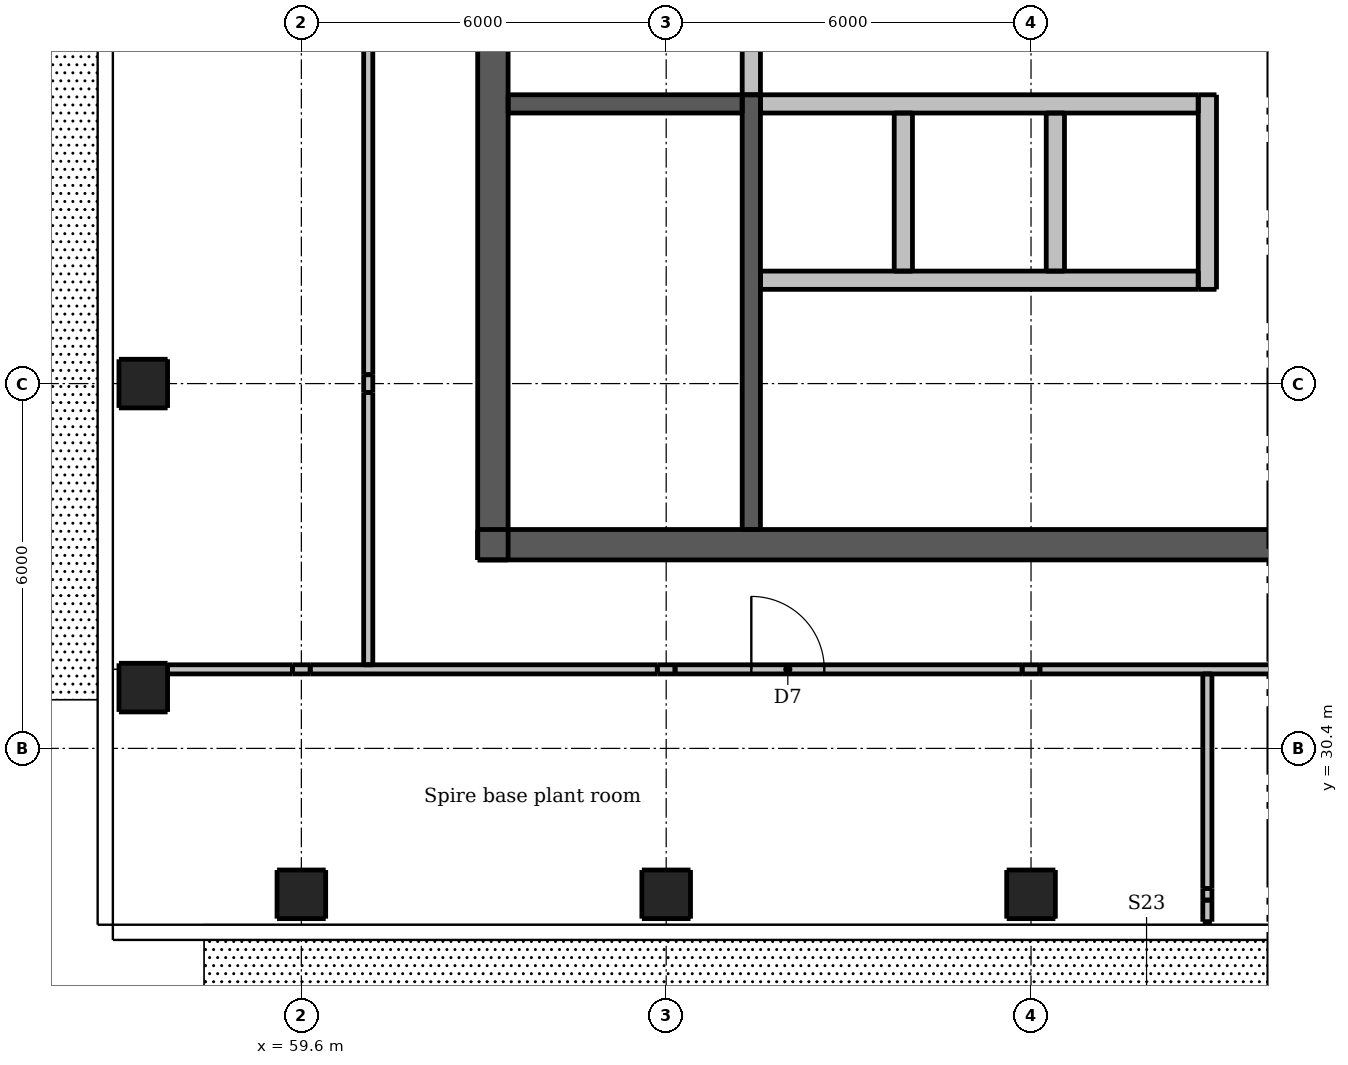
"""IFC4 building model, lengths in metres.
Left out: names, types, materials, properties, quantities, classifications, styles, units other than length and angle.
Written with IfcOpenShell. Run it as: python <this file> out.ifc"""

import sys

from ifc_helpers import new_model, si_unit, direction, frame, frame_2d, origin, origin_2d, place, context, subcontext, project, spatial, rectangle, extrude, element, fill, save


model = new_model("IFC4")
c1 = context("Model", 3, precision=1e-05, world=origin(), true_north=direction((0.0, 1.0)))
c2 = subcontext(c1, "Body", "Model", "MODEL_VIEW")
j1 = project(units=[si_unit("LENGTHUNIT", "METRE"), si_unit("PLANEANGLEUNIT", "RADIAN")], contexts=[c1])
p1 = place(None, origin())
s1 = spatial("IfcSite", under=j1, at=p1, CompositionType="ELEMENT")
p2 = place(p1, origin())
s2 = spatial("IfcBuilding", under=s1, at=p2, CompositionType="ELEMENT")
p3 = place(p2, frame((0.0, 0.0, 290.8)))
s3 = spatial("IfcBuildingStorey", under=s2, at=p3, CompositionType="ELEMENT", Elevation=290.8)
p4 = place(p3, frame((62.5, 33.75, 0.0), z_axis=(0.0, 0.0, 1.0), x_axis=(1.0, 0.0, 0.0)))
e1 = element("IfcWall", 1, at=p4, inside=s3, PredefinedType="SHEAR", context=c2, shape_type="SweptSolid", body=[
    extrude(rectangle(XDim=24.0, YDim=0.5, at=frame_2d((12.0, 0.0))), origin(), (0.0, 0.0, 1.0), 3.3),
])
p5 = place(p4, frame((1.875, 0.0, 0.0)))
e2 = element("IfcOpeningElement", 2, at=p5, cuts=e1, PredefinedType="OPENING", context=c2, shape_type="SweptSolid", body=[
    extrude(rectangle(XDim=1.1, YDim=2.1, at=frame_2d((0.55, 1.05))), frame((0.0, 0.26, 0.0), z_axis=(0.0, -1.0, 0.0), x_axis=(1.0, 0.0, 0.0)), (0.0, 0.0, 1.0), 0.52),
])
p6 = place(p4, frame((21.025, 0.0, 0.0)))
e3 = element("IfcOpeningElement", 3, at=p6, cuts=e1, PredefinedType="OPENING", context=c2, shape_type="SweptSolid", body=[
    extrude(rectangle(XDim=1.1, YDim=2.1, at=frame_2d((0.55, 1.05))), frame((0.0, 0.26, 0.0), z_axis=(0.0, -1.0, 0.0), x_axis=(1.0, 0.0, 0.0)), (0.0, 0.0, 1.0), 0.52),
])
p7 = place(p4, frame((11.55, 0.0, 0.0)))
e4 = element("IfcOpeningElement", 4, at=p7, cuts=e1, PredefinedType="OPENING", context=c2, shape_type="SweptSolid", body=[
    extrude(rectangle(XDim=0.9, YDim=2.1, at=frame_2d((0.45, 1.05))), frame((0.0, 0.26, 0.0), z_axis=(0.0, -1.0, 0.0), x_axis=(1.0, 0.0, 0.0)), (0.0, 0.0, 1.0), 0.52),
])
p8 = place(p3, frame((62.75, 33.5, 0.0), z_axis=(0.0, 0.0, 1.0), x_axis=(0.0, 1.0, 0.0)))
e5 = element("IfcWall", 5, at=p8, inside=s3, PredefinedType="SHEAR", context=c2, shape_type="SweptSolid", body=[
    extrude(rectangle(XDim=24.0, YDim=0.5, at=frame_2d((12.0, 0.0))), origin(), (0.0, 0.0, 1.0), 3.3),
])
p9 = place(p8, frame((11.55, 0.0, 0.0)))
e6 = element("IfcOpeningElement", 6, at=p9, cuts=e5, PredefinedType="OPENING", context=c2, shape_type="SweptSolid", body=[
    extrude(rectangle(XDim=0.9, YDim=2.1, at=frame_2d((0.45, 1.05))), frame((0.0, 0.26, 0.0), z_axis=(0.0, -1.0, 0.0), x_axis=(1.0, 0.0, 0.0)), (0.0, 0.0, 1.0), 0.52),
])
for number, where, z_axis, x_axis in (
    (7, (59.6, 28.0, 0.0), (0.0, 0.0, 1.0), (1.0, 0.0, 0.0)),
    (8, (65.6, 28.0, 0.0), (0.0, 0.0, 1.0), (1.0, 0.0, 0.0)),
    (9, (71.6, 28.0, 0.0), (0.0, 0.0, 1.0), (1.0, 0.0, 0.0)),
    (10, (57.0, 31.4, 0.0), (0.0, 0.0, 1.0), (1.0, 0.0, 0.0)),
    (11, (57.0, 36.4, 0.0), (0.0, 0.0, 1.0), (1.0, 0.0, 0.0)),
):
    element("IfcColumn", number, at=place(p3, frame(where, z_axis=z_axis, x_axis=x_axis)), inside=s3, PredefinedType="COLUMN", context=c2, shape_type="SweptSolid", body=[
        extrude(rectangle(XDim=0.8, YDim=0.8, at=origin_2d()), origin(), (0.0, 0.0, 1.0), 3.3),
    ])
p10 = place(p3, frame((67.0, 34.0, 0.0), z_axis=(0.0, 0.0, 1.0), x_axis=(0.0, 1.0, 0.0)))
e12 = element("IfcWall", 12, at=p10, inside=s3, PredefinedType="SHEAR", context=c2, shape_type="SweptSolid", body=[
    extrude(rectangle(XDim=7.15, YDim=0.3, at=frame_2d((3.575, 0.0))), origin(), (0.0, 0.0, 1.0), 3.3),
])
p11 = place(p10, frame((0.2, 0.0, 0.0)))
e13 = element("IfcOpeningElement", 13, at=p11, cuts=e12, PredefinedType="OPENING", context=c2, shape_type="SweptSolid", body=[
    extrude(rectangle(XDim=1.1, YDim=2.1, at=frame_2d((0.55, 1.05))), frame((0.0, 0.16, 0.0), z_axis=(0.0, -1.0, 0.0), x_axis=(1.0, 0.0, 0.0)), (0.0, 0.0, 1.0), 0.32),
])
p12 = place(p3, frame((67.0, 41.15, 0.0), z_axis=(0.0, 0.0, 1.0), x_axis=(0.0, 1.0, 0.0)))
e14 = element("IfcWall", 14, at=p12, inside=s3, PredefinedType="PARTITIONING", context=c2, shape_type="SweptSolid", body=[
    extrude(rectangle(XDim=8.7, YDim=0.3, at=frame_2d((4.35, 0.0))), origin(), (0.0, 0.0, 1.0), 3.3),
])
p13 = place(p12, frame((3.9, 0.0, 0.0)))
e15 = element("IfcOpeningElement", 15, at=p13, cuts=e14, PredefinedType="OPENING", context=c2, shape_type="SweptSolid", body=[
    extrude(rectangle(XDim=0.9, YDim=2.1, at=frame_2d((0.45, 1.05))), frame((0.0, 0.16, 0.0), z_axis=(0.0, -1.0, 0.0), x_axis=(1.0, 0.0, 0.0)), (0.0, 0.0, 1.0), 0.32),
])
p14 = place(p3, frame((63.0, 41.0, 0.0), z_axis=(0.0, 0.0, 1.0), x_axis=(1.0, 0.0, 0.0)))
e16 = element("IfcWall", 16, at=p14, inside=s3, PredefinedType="SHEAR", context=c2, shape_type="SweptSolid", body=[
    extrude(rectangle(XDim=3.85, YDim=0.3, at=frame_2d((1.925, 0.0))), origin(), (0.0, 0.0, 1.0), 3.3),
])
p15 = place(p3, frame((67.15, 38.1, 0.0), z_axis=(0.0, 0.0, 1.0), x_axis=(1.0, 0.0, 0.0)))
e17 = element("IfcWall", 17, at=p15, inside=s3, PredefinedType="PARTITIONING", context=c2, shape_type="SweptSolid", body=[
    extrude(rectangle(XDim=7.2, YDim=0.3, at=frame_2d((3.6, 0.0))), origin(), (0.0, 0.0, 1.0), 3.3),
])
p16 = place(p15, frame((0.55, 0.0, 0.0)))
e18 = element("IfcOpeningElement", 18, at=p16, cuts=e17, PredefinedType="OPENING", context=c2, shape_type="SweptSolid", body=[
    extrude(rectangle(XDim=1.1, YDim=2.1, at=frame_2d((0.55, 1.05))), frame((0.0, 0.16, 0.0), z_axis=(0.0, -1.0, 0.0), x_axis=(1.0, 0.0, 0.0)), (0.0, 0.0, 1.0), 0.32),
])
p17 = place(p15, frame((3.05, 0.0, 0.0)))
e19 = element("IfcOpeningElement", 19, at=p17, cuts=e17, PredefinedType="OPENING", context=c2, shape_type="SweptSolid", body=[
    extrude(rectangle(XDim=1.1, YDim=2.1, at=frame_2d((0.55, 1.05))), frame((0.0, 0.16, 0.0), z_axis=(0.0, -1.0, 0.0), x_axis=(1.0, 0.0, 0.0)), (0.0, 0.0, 1.0), 0.32),
])
p18 = place(p15, frame((5.5, 0.0, 0.0)))
e20 = element("IfcOpeningElement", 20, at=p18, cuts=e17, PredefinedType="OPENING", context=c2, shape_type="SweptSolid", body=[
    extrude(rectangle(XDim=1.2, YDim=2.1, at=frame_2d((0.6, 1.05))), frame((0.0, 0.16, 0.0), z_axis=(0.0, -1.0, 0.0), x_axis=(1.0, 0.0, 0.0)), (0.0, 0.0, 1.0), 0.32),
])
p19 = place(p3, frame((67.15, 41.0, 0.0), z_axis=(0.0, 0.0, 1.0), x_axis=(1.0, 0.0, 0.0)))
e21 = element("IfcWall", 21, at=p19, inside=s3, PredefinedType="PARTITIONING", context=c2, shape_type="SweptSolid", body=[
    extrude(rectangle(XDim=7.2, YDim=0.3, at=frame_2d((3.6, 0.0))), origin(), (0.0, 0.0, 1.0), 3.3),
])
for number, where, z_axis, x_axis in (
    (22, (69.5, 38.25, 0.0), (0.0, 0.0, 1.0), (0.0, 1.0, 0.0)),
    (23, (72.0, 38.25, 0.0), (0.0, 0.0, 1.0), (0.0, 1.0, 0.0)),
):
    element("IfcWall", number, at=place(p3, frame(where, z_axis=z_axis, x_axis=x_axis)), inside=s3, PredefinedType="PARTITIONING", context=c2, shape_type="SweptSolid", body=[
        extrude(rectangle(XDim=2.6, YDim=0.3, at=frame_2d((1.3, 0.0))), origin(), (0.0, 0.0, 1.0), 3.3),
    ])
p20 = place(p3, frame((74.5, 37.95, 0.0), z_axis=(0.0, 0.0, 1.0), x_axis=(0.0, 1.0, 0.0)))
e24 = element("IfcWall", 24, at=p20, inside=s3, PredefinedType="PARTITIONING", context=c2, shape_type="SweptSolid", body=[
    extrude(rectangle(XDim=3.2, YDim=0.3, at=frame_2d((1.6, 0.0))), origin(), (0.0, 0.0, 1.0), 3.3),
])
p21 = place(p3, frame((57.4, 31.7, 0.0), z_axis=(0.0, 0.0, 1.0), x_axis=(1.0, 0.0, 0.0)))
e25 = element("IfcWall", 25, at=p21, inside=s3, PredefinedType="PARTITIONING", context=c2, shape_type="SweptSolid", body=[
    extrude(rectangle(XDim=2.054, YDim=0.15, at=frame_2d((1.027, 0.0))), origin(), (0.0, 0.0, 1.0), 3.3),
])
p22 = place(p3, frame((59.454, 31.7, 0.0), z_axis=(0.0, 0.0, 1.0), x_axis=(1.0, 0.0, 0.0)))
e26 = element("IfcWall", 26, at=p22, inside=s3, PredefinedType="PARTITIONING", context=c2, shape_type="SweptSolid", body=[
    extrude(rectangle(XDim=0.292, YDim=0.15, at=frame_2d((0.146, 0.0))), origin(), (0.0, 0.0, 1.0), 2.462),
])
p23 = place(p3, frame((59.746, 31.7, 0.0), z_axis=(0.0, 0.0, 1.0), x_axis=(1.0, 0.0, 0.0)))
e27 = element("IfcWall", 27, at=p23, inside=s3, PredefinedType="PARTITIONING", context=c2, shape_type="SweptSolid", body=[
    extrude(rectangle(XDim=5.708, YDim=0.15, at=frame_2d((2.854, 0.0))), origin(), (0.0, 0.0, 1.0), 3.3),
])
p24 = place(p3, frame((65.454, 31.7, 0.0), z_axis=(0.0, 0.0, 1.0), x_axis=(1.0, 0.0, 0.0)))
e28 = element("IfcWall", 28, at=p24, inside=s3, PredefinedType="PARTITIONING", context=c2, shape_type="SweptSolid", body=[
    extrude(rectangle(XDim=0.292, YDim=0.15, at=frame_2d((0.146, 0.0))), origin(), (0.0, 0.0, 1.0), 2.465),
])
p25 = place(p3, frame((65.746, 31.7, 0.0), z_axis=(0.0, 0.0, 1.0), x_axis=(1.0, 0.0, 0.0)))
e29 = element("IfcWall", 29, at=p25, inside=s3, PredefinedType="PARTITIONING", context=c2, shape_type="SweptSolid", body=[
    extrude(rectangle(XDim=5.708, YDim=0.15, at=frame_2d((2.854, 0.0))), origin(), (0.0, 0.0, 1.0), 3.3),
])
p26 = place(p25, frame((1.254, 0.0, 0.0)))
e30 = element("IfcOpeningElement", 30, at=p26, cuts=e29, PredefinedType="OPENING", context=c2, shape_type="SweptSolid", body=[
    extrude(rectangle(XDim=1.2, YDim=2.1, at=frame_2d((0.6, 1.05))), frame((0.0, 0.085, 0.0), z_axis=(0.0, -1.0, 0.0), x_axis=(1.0, 0.0, 0.0)), (0.0, 0.0, 1.0), 0.17),
])
p27 = place(p3, frame((71.454, 31.7, 0.0), z_axis=(0.0, 0.0, 1.0), x_axis=(1.0, 0.0, 0.0)))
e31 = element("IfcWall", 31, at=p27, inside=s3, PredefinedType="PARTITIONING", context=c2, shape_type="SweptSolid", body=[
    extrude(rectangle(XDim=0.292, YDim=0.15, at=frame_2d((0.146, 0.0))), origin(), (0.0, 0.0, 1.0), 2.465),
])
p28 = place(p3, frame((71.746, 31.7, 0.0), z_axis=(0.0, 0.0, 1.0), x_axis=(1.0, 0.0, 0.0)))
e32 = element("IfcWall", 32, at=p28, inside=s3, PredefinedType="PARTITIONING", context=c2, shape_type="SweptSolid", body=[
    extrude(rectangle(XDim=5.708, YDim=0.15, at=frame_2d((2.854, 0.0))), origin(), (0.0, 0.0, 1.0), 3.3),
])
p29 = place(p3, frame((60.7, 31.775, 0.0), z_axis=(0.0, 0.0, 1.0), x_axis=(0.0, 1.0, 0.0)))
e33 = element("IfcWall", 33, at=p29, inside=s3, PredefinedType="PARTITIONING", context=c2, shape_type="SweptSolid", body=[
    extrude(rectangle(XDim=4.479, YDim=0.15, at=frame_2d((2.24, 0.0))), origin(), (0.0, 0.0, 1.0), 3.3),
])
p30 = place(p3, frame((60.7, 36.254, 0.0), z_axis=(0.0, 0.0, 1.0), x_axis=(0.0, 1.0, 0.0)))
e34 = element("IfcWall", 34, at=p30, inside=s3, PredefinedType="PARTITIONING", context=c2, shape_type="SweptSolid", body=[
    extrude(rectangle(XDim=0.292, YDim=0.15, at=frame_2d((0.146, 0.0))), origin(), (0.0, 0.0, 1.0), 2.459),
])
p31 = place(p3, frame((60.7, 36.546, 0.0), z_axis=(0.0, 0.0, 1.0), x_axis=(0.0, 1.0, 0.0)))
e35 = element("IfcWall", 35, at=p31, inside=s3, PredefinedType="PARTITIONING", context=c2, shape_type="SweptSolid", body=[
    extrude(rectangle(XDim=5.708, YDim=0.15, at=frame_2d((2.854, 0.0))), origin(), (0.0, 0.0, 1.0), 3.3),
])
p32 = place(p3, frame((74.5, 27.55, 0.0), z_axis=(0.0, 0.0, 1.0), x_axis=(0.0, 1.0, 0.0)))
e36 = element("IfcWall", 36, at=p32, inside=s3, PredefinedType="PARTITIONING", context=c2, shape_type="SweptSolid", body=[
    extrude(rectangle(XDim=0.355, YDim=0.15, at=frame_2d((0.177, 0.0))), origin(), (0.0, 0.0, 1.0), 3.3),
])
p33 = place(p3, frame((74.5, 27.905, 0.0), z_axis=(0.0, 0.0, 1.0), x_axis=(0.0, 1.0, 0.0)))
e37 = element("IfcWall", 37, at=p33, inside=s3, PredefinedType="PARTITIONING", context=c2, shape_type="SweptSolid", body=[
    extrude(rectangle(XDim=0.19, YDim=0.15, at=frame_2d((0.095, 0.0))), origin(), (0.0, 0.0, 1.0), 2.847),
])
p34 = place(p3, frame((74.5, 28.095, 0.0), z_axis=(0.0, 0.0, 1.0), x_axis=(0.0, 1.0, 0.0)))
e38 = element("IfcWall", 38, at=p34, inside=s3, PredefinedType="PARTITIONING", context=c2, shape_type="SweptSolid", body=[
    extrude(rectangle(XDim=3.53, YDim=0.15, at=frame_2d((1.765, 0.0))), origin(), (0.0, 0.0, 1.0), 3.3),
])
p35 = place(p11, origin())
e39 = element("IfcDoor", 39, at=p35, inside=s3, OperationType="SINGLE_SWING_LEFT", PredefinedType="DOOR", context=c2, shape_type="SweptSolid", body=[
    extrude(rectangle(XDim=1.1, YDim=2.1, at=frame_2d((0.55, 1.05))), frame((0.0, 0.138, 0.0), z_axis=(0.0, -1.0, 0.0), x_axis=(1.0, 0.0, 0.0)), (0.0, 0.0, 1.0), 0.05),
])
fill(e13, e39)
p36 = place(p5, origin())
e40 = element("IfcDoor", 40, at=p36, inside=s3, OperationType="SINGLE_SWING_LEFT", PredefinedType="DOOR", context=c2, shape_type="SweptSolid", body=[
    extrude(rectangle(XDim=1.1, YDim=2.1, at=frame_2d((0.55, 1.05))), frame((0.0, 0.237, 0.0), z_axis=(0.0, -1.0, 0.0), x_axis=(1.0, 0.0, 0.0)), (0.0, 0.0, 1.0), 0.05),
])
fill(e2, e40)
p37 = place(p7, origin())
e41 = element("IfcDoor", 41, at=p37, inside=s3, OperationType="SINGLE_SWING_LEFT", PredefinedType="DOOR", context=c2, shape_type="SweptSolid", body=[
    extrude(rectangle(XDim=0.9, YDim=2.1, at=frame_2d((0.45, 1.05))), frame((0.0, 0.237, 0.0), z_axis=(0.0, -1.0, 0.0), x_axis=(1.0, 0.0, 0.0)), (0.0, 0.0, 1.0), 0.05),
])
fill(e4, e41)
p38 = place(p16, origin())
e42 = element("IfcDoor", 42, at=p38, inside=s3, OperationType="DOUBLE_DOOR_SLIDING", PredefinedType="DOOR", context=c2, shape_type="SweptSolid", body=[
    extrude(rectangle(XDim=1.1, YDim=2.1, at=frame_2d((0.55, 1.05))), frame((0.0, 0.025, 0.0), z_axis=(0.0, -1.0, 0.0), x_axis=(1.0, 0.0, 0.0)), (0.0, 0.0, 1.0), 0.05),
])
fill(e18, e42)
p39 = place(p17, origin())
e43 = element("IfcDoor", 43, at=p39, inside=s3, OperationType="DOUBLE_DOOR_SLIDING", PredefinedType="DOOR", context=c2, shape_type="SweptSolid", body=[
    extrude(rectangle(XDim=1.1, YDim=2.1, at=frame_2d((0.55, 1.05))), frame((0.0, 0.025, 0.0), z_axis=(0.0, -1.0, 0.0), x_axis=(1.0, 0.0, 0.0)), (0.0, 0.0, 1.0), 0.05),
])
fill(e19, e43)
p40 = place(p18, origin())
e44 = element("IfcDoor", 44, at=p40, inside=s3, OperationType="DOUBLE_DOOR_SLIDING", PredefinedType="DOOR", context=c2, shape_type="SweptSolid", body=[
    extrude(rectangle(XDim=1.2, YDim=2.1, at=frame_2d((0.6, 1.05))), frame((0.0, 0.025, 0.0), z_axis=(0.0, -1.0, 0.0), x_axis=(1.0, 0.0, 0.0)), (0.0, 0.0, 1.0), 0.05),
])
fill(e20, e44)
p41 = place(p26, origin())
e45 = element("IfcDoor", 45, at=p41, inside=s3, OperationType="SINGLE_SWING_LEFT", PredefinedType="DOOR", context=c2, shape_type="SweptSolid", body=[
    extrude(rectangle(XDim=1.2, YDim=2.1, at=frame_2d((0.6, 1.05))), frame((0.0, 0.025, 0.0), z_axis=(0.0, -1.0, 0.0), x_axis=(1.0, 0.0, 0.0)), (0.0, 0.0, 1.0), 0.05),
])
fill(e30, e45)
save(model, sys.argv[1])
